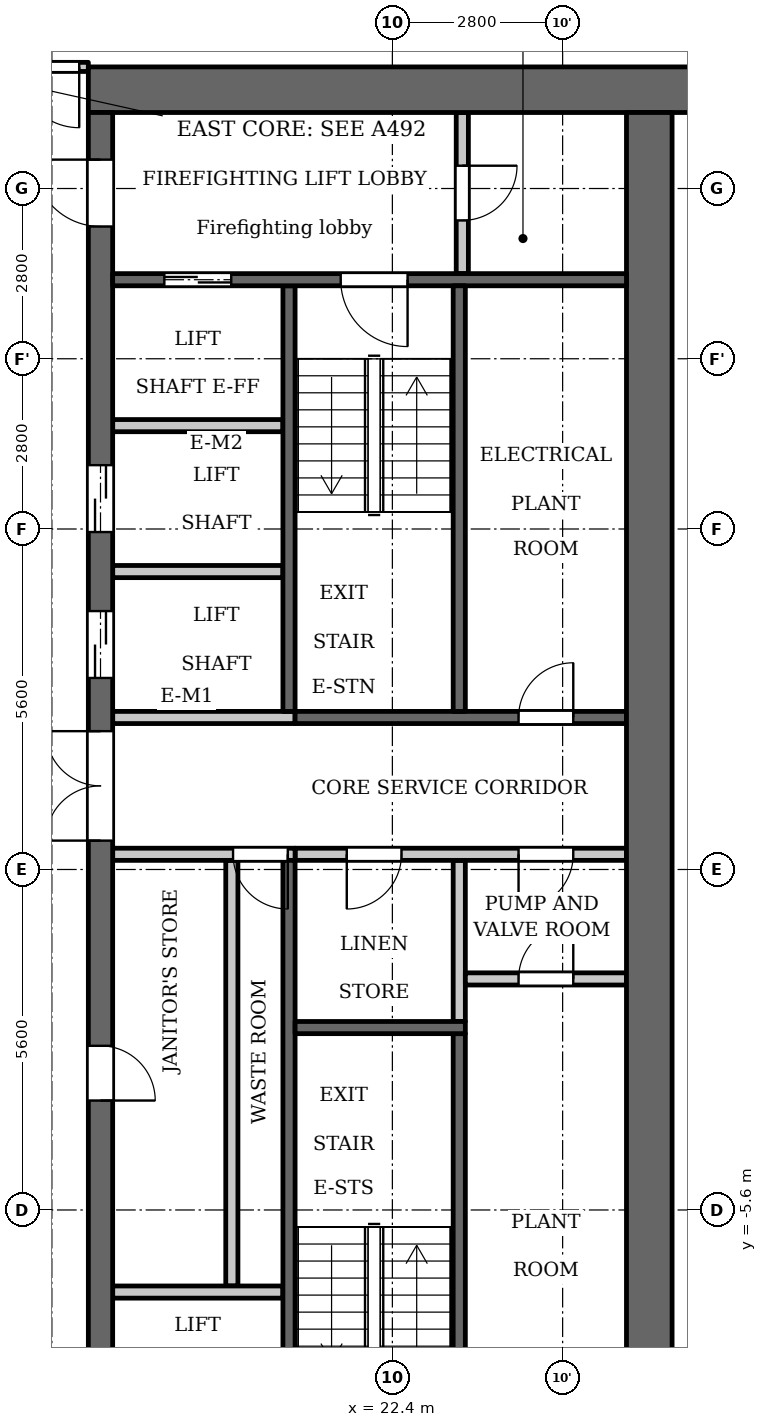
"""IFC4 building model, lengths in metres.
Left out: names, types, materials, properties, quantities, classifications, styles, units other than length and angle.
Written with IfcOpenShell. Run it as: python <this file> out.ifc"""

import sys

from ifc_helpers import new_model, si_unit, direction, frame, frame_2d, origin, place, context, subcontext, project, spatial, rectangle, extrude, element, fill, save


model = new_model("IFC4")
c1 = context("Model", 3, precision=1e-05, world=origin(), true_north=direction((0.0, 1.0)))
c2 = subcontext(c1, "Body", "Model", "MODEL_VIEW")
j1 = project(units=[si_unit("LENGTHUNIT", "METRE"), si_unit("PLANEANGLEUNIT", "RADIAN")], contexts=[c1])
p1 = place(None, origin())
s1 = spatial("IfcSite", under=j1, at=p1, CompositionType="ELEMENT")
p2 = place(p1, origin())
s2 = spatial("IfcBuilding", under=s1, at=p2, CompositionType="ELEMENT")
p3 = place(p2, frame((0.0, 0.0, 171.1)))
s3 = spatial("IfcBuildingStorey", under=s2, at=p3, CompositionType="ELEMENT", Elevation=171.1)
p4 = place(p3, frame((23.5, -2.5, 0.0), z_axis=(0.0, 0.0, 1.0), x_axis=(0.0, 1.0, 0.0)))
e1 = element("IfcWall", 1, at=p4, inside=s3, PredefinedType="PARTITIONING", context=c2, shape_type="SweptSolid", body=[
    extrude(rectangle(XDim=2.65, YDim=0.2, at=frame_2d((1.325, 0.0))), origin(), (0.0, 0.0, 1.0), 3.2),
])
p5 = place(p3, frame((20.7, 2.6, 0.0), z_axis=(0.0, 0.0, 1.0), x_axis=(0.0, 1.0, 0.0)))
e2 = element("IfcWall", 2, at=p5, inside=s3, PredefinedType="SHEAR", context=c2, shape_type="SweptSolid", body=[
    extrude(rectangle(XDim=7.0, YDim=0.2, at=frame_2d((3.5, 0.0))), origin(), (0.0, 0.0, 1.0), 3.2),
])
p6 = place(p3, frame((20.7, -9.6, 0.0), z_axis=(0.0, 0.0, 1.0), x_axis=(0.0, 1.0, 0.0)))
e3 = element("IfcWall", 3, at=p6, inside=s3, PredefinedType="SHEAR", context=c2, shape_type="SweptSolid", body=[
    extrude(rectangle(XDim=9.75, YDim=0.2, at=frame_2d((4.875, 0.0))), origin(), (0.0, 0.0, 1.0), 3.2),
])
p7 = place(p3, frame((20.8, 2.5, 0.0), z_axis=(0.0, 0.0, 1.0), x_axis=(1.0, 0.0, 0.0)))
e4 = element("IfcWall", 4, at=p7, inside=s3, PredefinedType="SHEAR", context=c2, shape_type="SweptSolid", body=[
    extrude(rectangle(XDim=5.45, YDim=0.2, at=frame_2d((2.725, 0.0))), origin(), (0.0, 0.0, 1.0), 3.2),
])
p8 = place(p7, frame((3.675, 0.0, 0.0)))
e5 = element("IfcOpeningElement", 5, at=p8, cuts=e4, PredefinedType="OPENING", context=c2, shape_type="SweptSolid", body=[
    extrude(rectangle(XDim=0.9, YDim=2.1, at=frame_2d((0.45, 1.05))), frame((0.0, 0.11, 0.0), z_axis=(0.0, -1.0, 0.0), x_axis=(1.0, 0.0, 0.0)), (0.0, 0.0, 1.0), 0.22),
])
p9 = place(p3, frame((20.8, 0.25, 0.0), z_axis=(0.0, 0.0, 1.0), x_axis=(1.0, 0.0, 0.0)))
e6 = element("IfcWall", 6, at=p9, inside=s3, PredefinedType="PARTITIONING", context=c2, shape_type="SweptSolid", body=[
    extrude(rectangle(XDim=5.45, YDim=0.2, at=frame_2d((2.725, 0.0))), origin(), (0.0, 0.0, 1.0), 3.2),
])
p10 = place(p9, frame((0.85, 0.0, 0.0)))
e7 = element("IfcOpeningElement", 7, at=p10, cuts=e6, PredefinedType="OPENING", context=c2, shape_type="SweptSolid", body=[
    extrude(rectangle(XDim=0.9, YDim=2.1, at=frame_2d((0.45, 1.05))), frame((0.0, 0.11, 0.0), z_axis=(0.0, -1.0, 0.0), x_axis=(1.0, 0.0, 0.0)), (0.0, 0.0, 1.0), 0.22),
])
p11 = place(p9, frame((3.675, 0.0, 0.0)))
e8 = element("IfcOpeningElement", 8, at=p11, cuts=e6, PredefinedType="OPENING", context=c2, shape_type="SweptSolid", body=[
    extrude(rectangle(XDim=0.9, YDim=2.1, at=frame_2d((0.45, 1.05))), frame((0.0, 0.11, 0.0), z_axis=(0.0, -1.0, 0.0), x_axis=(1.0, 0.0, 0.0)), (0.0, 0.0, 1.0), 0.22),
])
p12 = place(p3, frame((17.4, 12.825, 0.0), z_axis=(0.0, 0.0, 1.0), x_axis=(1.0, 0.0, 0.0)))
e9 = element("IfcWall", 9, at=p12, inside=s3, PredefinedType="SHEAR", context=c2, shape_type="SweptSolid", body=[
    extrude(rectangle(XDim=10.4, YDim=0.75, at=frame_2d((5.2, 0.0))), origin(), (0.0, 0.0, 1.0), 3.2),
])
p13 = place(p3, frame((19.76, -6.85, 0.0), z_axis=(0.0, 0.0, 1.0), x_axis=(0.0, 1.0, 0.0)))
e10 = element("IfcWall", 10, at=p13, inside=s3, PredefinedType="PARTITIONING", context=c2, shape_type="SweptSolid", body=[
    extrude(rectangle(XDim=7.0, YDim=0.2, at=frame_2d((3.5, 0.0))), origin(), (0.0, 0.0, 1.0), 3.2),
])
p14 = place(p3, frame((17.6, -12.45, 0.0), z_axis=(0.0, 0.0, 1.0), x_axis=(0.0, 1.0, 0.0)))
e11 = element("IfcWall", 11, at=p14, inside=s3, PredefinedType="SHEAR", context=c2, shape_type="SweptSolid", body=[
    extrude(rectangle(XDim=24.9, YDim=0.4, at=frame_2d((12.45, 0.0))), origin(), (0.0, 0.0, 1.0), 3.2),
])
p15 = place(p14, frame((8.65, 0.0, 0.0)))
e12 = element("IfcOpeningElement", 12, at=p15, cuts=e11, PredefinedType="OPENING", context=c2, shape_type="SweptSolid", body=[
    extrude(rectangle(XDim=0.9, YDim=2.1, at=frame_2d((0.45, 1.05))), frame((0.0, 0.21, 0.0), z_axis=(0.0, -1.0, 0.0), x_axis=(1.0, 0.0, 0.0)), (0.0, 0.0, 1.0), 0.42),
])
p16 = place(p14, frame((15.6, 0.0, 0.0)))
e13 = element("IfcOpeningElement", 13, at=p16, cuts=e11, PredefinedType="OPENING", context=c2, shape_type="SweptSolid", body=[
    extrude(rectangle(XDim=1.1, YDim=2.1, at=frame_2d((0.55, 1.05))), frame((0.0, 0.21, 0.0), z_axis=(0.0, -1.0, 0.0), x_axis=(1.0, 0.0, 0.0)), (0.0, 0.0, 1.0), 0.42),
])
p17 = place(p14, frame((18.0, 0.0, 0.0)))
e14 = element("IfcOpeningElement", 14, at=p17, cuts=e11, PredefinedType="OPENING", context=c2, shape_type="SweptSolid", body=[
    extrude(rectangle(XDim=1.1, YDim=2.1, at=frame_2d((0.55, 1.05))), frame((0.0, 0.21, 0.0), z_axis=(0.0, -1.0, 0.0), x_axis=(1.0, 0.0, 0.0)), (0.0, 0.0, 1.0), 0.42),
])
p18 = place(p14, frame((23.025, 0.0, 0.0)))
e15 = element("IfcOpeningElement", 15, at=p18, cuts=e11, PredefinedType="OPENING", context=c2, shape_type="SweptSolid", body=[
    extrude(rectangle(XDim=1.1, YDim=2.1, at=frame_2d((0.55, 1.05))), frame((0.0, 0.21, 0.0), z_axis=(0.0, -1.0, 0.0), x_axis=(1.0, 0.0, 0.0)), (0.0, 0.0, 1.0), 0.42),
])
p19 = place(p14, frame((0.775, 0.0, 0.0)))
e16 = element("IfcOpeningElement", 16, at=p19, cuts=e11, PredefinedType="OPENING", context=c2, shape_type="SweptSolid", body=[
    extrude(rectangle(XDim=1.1, YDim=2.1, at=frame_2d((0.55, 1.05))), frame((0.0, 0.21, 0.0), z_axis=(0.0, -1.0, 0.0), x_axis=(1.0, 0.0, 0.0)), (0.0, 0.0, 1.0), 0.42),
])
p20 = place(p14, frame((12.925, 0.0, 0.0)))
e17 = element("IfcOpeningElement", 17, at=p20, cuts=e11, PredefinedType="OPENING", context=c2, shape_type="SweptSolid", body=[
    extrude(rectangle(XDim=1.8, YDim=2.1, at=frame_2d((0.9, 1.05))), frame((0.0, 0.21, 0.0), z_axis=(0.0, -1.0, 0.0), x_axis=(1.0, 0.0, 0.0)), (0.0, 0.0, 1.0), 0.42),
])
p21 = place(p3, frame((26.625, -12.45, 0.0), z_axis=(0.0, 0.0, 1.0), x_axis=(0.0, 1.0, 0.0)))
e18 = element("IfcWall", 18, at=p21, inside=s3, PredefinedType="SHEAR", context=c2, shape_type="SweptSolid", body=[
    extrude(rectangle(XDim=24.9, YDim=0.75, at=frame_2d((12.45, 0.0))), origin(), (0.0, 0.0, 1.0), 3.2),
])
p22 = place(p3, frame((23.55, 9.8, 0.0), z_axis=(0.0, 0.0, 1.0), x_axis=(0.0, 1.0, 0.0)))
e19 = element("IfcWall", 19, at=p22, inside=s3, PredefinedType="PARTITIONING", context=c2, shape_type="SweptSolid", body=[
    extrude(rectangle(XDim=2.65, YDim=0.2, at=frame_2d((1.325, 0.0))), origin(), (0.0, 0.0, 1.0), 3.2),
])
p23 = place(p22, frame((0.875, 0.0, 0.0)))
e20 = element("IfcOpeningElement", 20, at=p23, cuts=e19, PredefinedType="OPENING", context=c2, shape_type="SweptSolid", body=[
    extrude(rectangle(XDim=0.9, YDim=2.1, at=frame_2d((0.45, 1.05))), frame((0.0, 0.11, 0.0), z_axis=(0.0, -1.0, 0.0), x_axis=(1.0, 0.0, 0.0)), (0.0, 0.0, 1.0), 0.22),
])
p24 = place(p3, frame((23.6, -1.8, 0.0), z_axis=(0.0, 0.0, 1.0), x_axis=(1.0, 0.0, 0.0)))
e21 = element("IfcWall", 21, at=p24, inside=s3, PredefinedType="PARTITIONING", context=c2, shape_type="SweptSolid", body=[
    extrude(rectangle(XDim=2.65, YDim=0.2, at=frame_2d((1.325, 0.0))), origin(), (0.0, 0.0, 1.0), 3.2),
])
p25 = place(p24, frame((0.875, 0.0, 0.0)))
e22 = element("IfcOpeningElement", 22, at=p25, cuts=e21, PredefinedType="OPENING", context=c2, shape_type="SweptSolid", body=[
    extrude(rectangle(XDim=0.9, YDim=2.1, at=frame_2d((0.45, 1.05))), frame((0.0, 0.11, 0.0), z_axis=(0.0, -1.0, 0.0), x_axis=(1.0, 0.0, 0.0)), (0.0, 0.0, 1.0), 0.22),
])
p26 = place(p3, frame((17.8, -6.95, 0.0), z_axis=(0.0, 0.0, 1.0), x_axis=(1.0, 0.0, 0.0)))
e23 = element("IfcWall", 23, at=p26, inside=s3, PredefinedType="PARTITIONING", context=c2, shape_type="SweptSolid", body=[
    extrude(rectangle(XDim=2.8, YDim=0.2, at=frame_2d((1.4, 0.0))), origin(), (0.0, 0.0, 1.0), 3.2),
])
p27 = place(p3, frame((17.8, 0.25, 0.0), z_axis=(0.0, 0.0, 1.0), x_axis=(1.0, 0.0, 0.0)))
e24 = element("IfcWall", 24, at=p27, inside=s3, PredefinedType="PARTITIONING", context=c2, shape_type="SweptSolid", body=[
    extrude(rectangle(XDim=3.0, YDim=0.2, at=frame_2d((1.5, 0.0))), origin(), (0.0, 0.0, 1.0), 3.2),
])
p28 = place(p27, frame((1.98, 0.0, 0.0)))
e25 = element("IfcOpeningElement", 25, at=p28, cuts=e24, PredefinedType="OPENING", context=c2, shape_type="SweptSolid", body=[
    extrude(rectangle(XDim=0.9, YDim=2.1, at=frame_2d((0.45, 1.05))), frame((0.0, 0.11, 0.0), z_axis=(0.0, -1.0, 0.0), x_axis=(1.0, 0.0, 0.0)), (0.0, 0.0, 1.0), 0.22),
])
p29 = place(p3, frame((17.8, 2.5, 0.0), z_axis=(0.0, 0.0, 1.0), x_axis=(1.0, 0.0, 0.0)))
e26 = element("IfcWall", 26, at=p29, inside=s3, PredefinedType="PARTITIONING", context=c2, shape_type="SweptSolid", body=[
    extrude(rectangle(XDim=3.0, YDim=0.2, at=frame_2d((1.5, 0.0))), origin(), (0.0, 0.0, 1.0), 3.2),
])
for number, where, z_axis, x_axis in (
    (27, (17.8, 4.9, 0.0), (0.0, 0.0, 1.0), (1.0, 0.0, 0.0)),
    (28, (17.8, 7.3, 0.0), (0.0, 0.0, 1.0), (1.0, 0.0, 0.0)),
):
    element("IfcWall", number, at=place(p3, frame(where, z_axis=z_axis, x_axis=x_axis)), inside=s3, PredefinedType="PARTITIONING", context=c2, shape_type="SweptSolid", body=[
        extrude(rectangle(XDim=2.8, YDim=0.2, at=frame_2d((1.4, 0.0))), origin(), (0.0, 0.0, 1.0), 3.2),
    ])
p30 = place(p3, frame((17.8, 9.7, 0.0), z_axis=(0.0, 0.0, 1.0), x_axis=(1.0, 0.0, 0.0)))
e29 = element("IfcWall", 29, at=p30, inside=s3, PredefinedType="SHEAR", context=c2, shape_type="SweptSolid", body=[
    extrude(rectangle(XDim=8.45, YDim=0.2, at=frame_2d((4.225, 0.0))), origin(), (0.0, 0.0, 1.0), 3.2),
])
p31 = place(p30, frame((0.85, 0.0, 0.0)))
e30 = element("IfcOpeningElement", 30, at=p31, cuts=e29, PredefinedType="OPENING", context=c2, shape_type="SweptSolid", body=[
    extrude(rectangle(XDim=1.1, YDim=2.1, at=frame_2d((0.55, 1.05))), frame((0.0, 0.11, 0.0), z_axis=(0.0, -1.0, 0.0), x_axis=(1.0, 0.0, 0.0)), (0.0, 0.0, 1.0), 0.22),
])
p32 = place(p30, frame((3.75, 0.0, 0.0)))
e31 = element("IfcOpeningElement", 31, at=p32, cuts=e29, PredefinedType="OPENING", context=c2, shape_type="SweptSolid", body=[
    extrude(rectangle(XDim=1.1, YDim=2.1, at=frame_2d((0.55, 1.05))), frame((0.0, 0.11, 0.0), z_axis=(0.0, -1.0, 0.0), x_axis=(1.0, 0.0, 0.0)), (0.0, 0.0, 1.0), 0.22),
])
p33 = place(p3, frame((23.5, 2.6, 0.0), z_axis=(0.0, 0.0, 1.0), x_axis=(0.0, 1.0, 0.0)))
e32 = element("IfcWall", 32, at=p33, inside=s3, PredefinedType="SHEAR", context=c2, shape_type="SweptSolid", body=[
    extrude(rectangle(XDim=7.0, YDim=0.2, at=frame_2d((3.5, 0.0))), origin(), (0.0, 0.0, 1.0), 3.2),
])
p34 = place(p3, frame((23.5, -9.6, 0.0), z_axis=(0.0, 0.0, 1.0), x_axis=(0.0, 1.0, 0.0)))
e33 = element("IfcWall", 33, at=p34, inside=s3, PredefinedType="SHEAR", context=c2, shape_type="SweptSolid", body=[
    extrude(rectangle(XDim=6.9, YDim=0.2, at=frame_2d((3.45, 0.0))), origin(), (0.0, 0.0, 1.0), 3.2),
])
p35 = place(p3, frame((20.8, -2.6, 0.0), z_axis=(0.0, 0.0, 1.0), x_axis=(1.0, 0.0, 0.0)))
e34 = element("IfcWall", 34, at=p35, inside=s3, PredefinedType="SHEAR", context=c2, shape_type="SweptSolid", body=[
    extrude(rectangle(XDim=2.8, YDim=0.2, at=frame_2d((1.4, 0.0))), origin(), (0.0, 0.0, 1.0), 3.2),
])
p36 = place(p3, frame((-17.4, 13.2, 0.0), z_axis=(0.0, 0.0, 1.0), x_axis=(1.0, 0.0, 0.0)))
e35 = element("IfcWall", 35, at=p36, inside=s3, PredefinedType="PARTITIONING", context=c2, shape_type="SweptSolid", body=[
    extrude(rectangle(XDim=34.8, YDim=0.15, at=frame_2d((17.4, 0.0))), origin(), (0.0, 0.0, 1.0), 3.2),
])
p37 = place(p36, frame((0.25, 0.0, 0.0)))
e36 = element("IfcOpeningElement", 36, at=p37, cuts=e35, PredefinedType="OPENING", context=c2, shape_type="SweptSolid", body=[
    extrude(rectangle(XDim=1.0, YDim=2.1, at=frame_2d((0.5, 1.05))), frame((0.0, 0.085, 0.0), z_axis=(0.0, -1.0, 0.0), x_axis=(1.0, 0.0, 0.0)), (0.0, 0.0, 1.0), 0.17),
])
p38 = place(p36, frame((33.65, 0.0, 0.0)))
e37 = element("IfcOpeningElement", 37, at=p38, cuts=e35, PredefinedType="OPENING", context=c2, shape_type="SweptSolid", body=[
    extrude(rectangle(XDim=1.0, YDim=2.1, at=frame_2d((0.5, 1.05))), frame((0.0, 0.085, 0.0), z_axis=(0.0, -1.0, 0.0), x_axis=(1.0, 0.0, 0.0)), (0.0, 0.0, 1.0), 0.17),
])
p39 = place(p36, frame((10.15, 0.0, 0.0)))
e38 = element("IfcOpeningElement", 38, at=p39, cuts=e35, PredefinedType="OPENING", context=c2, shape_type="SweptSolid", body=[
    extrude(rectangle(XDim=1.0, YDim=2.1, at=frame_2d((0.5, 1.05))), frame((0.0, 0.085, 0.0), z_axis=(0.0, -1.0, 0.0), x_axis=(1.0, 0.0, 0.0)), (0.0, 0.0, 1.0), 0.17),
])
p40 = place(p36, frame((15.75, 0.0, 0.0)))
e39 = element("IfcOpeningElement", 39, at=p40, cuts=e35, PredefinedType="OPENING", context=c2, shape_type="SweptSolid", body=[
    extrude(rectangle(XDim=1.0, YDim=2.1, at=frame_2d((0.5, 1.05))), frame((0.0, 0.085, 0.0), z_axis=(0.0, -1.0, 0.0), x_axis=(1.0, 0.0, 0.0)), (0.0, 0.0, 1.0), 0.17),
])
p41 = place(p36, frame((24.95, 0.0, 0.0)))
e40 = element("IfcOpeningElement", 40, at=p41, cuts=e35, PredefinedType="OPENING", context=c2, shape_type="SweptSolid", body=[
    extrude(rectangle(XDim=1.0, YDim=2.1, at=frame_2d((0.5, 1.05))), frame((0.0, 0.085, 0.0), z_axis=(0.0, -1.0, 0.0), x_axis=(1.0, 0.0, 0.0)), (0.0, 0.0, 1.0), 0.17),
])
p42 = place(p36, frame((29.95, 0.0, 0.0)))
e41 = element("IfcOpeningElement", 41, at=p42, cuts=e35, PredefinedType="OPENING", context=c2, shape_type="SweptSolid", body=[
    extrude(rectangle(XDim=1.0, YDim=2.1, at=frame_2d((0.5, 1.05))), frame((0.0, 0.085, 0.0), z_axis=(0.0, -1.0, 0.0), x_axis=(1.0, 0.0, 0.0)), (0.0, 0.0, 1.0), 0.17),
])
p43 = place(p15, origin())
e42 = element("IfcDoor", 42, at=p43, inside=s3, OperationType="SINGLE_SWING_LEFT", PredefinedType="DOOR", context=c2, shape_type="SweptSolid", body=[
    extrude(rectangle(XDim=0.9, YDim=2.1, at=frame_2d((0.45, 1.05))), frame((0.0, 0.025, 0.0), z_axis=(0.0, -1.0, 0.0), x_axis=(1.0, 0.0, 0.0)), (0.0, 0.0, 1.0), 0.05),
])
fill(e12, e42)
p44 = place(p28, origin())
e43 = element("IfcDoor", 43, at=p44, inside=s3, OperationType="SINGLE_SWING_RIGHT", PredefinedType="DOOR", context=c2, shape_type="SweptSolid", body=[
    extrude(rectangle(XDim=0.9, YDim=2.1, at=frame_2d((0.45, 1.05))), frame((0.0, 0.025, 0.0), z_axis=(0.0, -1.0, 0.0), x_axis=(1.0, 0.0, 0.0)), (0.0, 0.0, 1.0), 0.05),
])
fill(e25, e43)
p45 = place(p16, origin())
e44 = element("IfcDoor", 44, at=p45, inside=s3, OperationType="DOUBLE_DOOR_SLIDING", PredefinedType="DOOR", context=c2, shape_type="SweptSolid", body=[
    extrude(rectangle(XDim=1.1, YDim=2.1, at=frame_2d((0.55, 1.05))), frame((0.0, 0.025, 0.0), z_axis=(0.0, -1.0, 0.0), x_axis=(1.0, 0.0, 0.0)), (0.0, 0.0, 1.0), 0.05),
])
fill(e13, e44)
p46 = place(p17, origin())
e45 = element("IfcDoor", 45, at=p46, inside=s3, OperationType="DOUBLE_DOOR_SLIDING", PredefinedType="DOOR", context=c2, shape_type="SweptSolid", body=[
    extrude(rectangle(XDim=1.1, YDim=2.1, at=frame_2d((0.55, 1.05))), frame((0.0, 0.025, 0.0), z_axis=(0.0, -1.0, 0.0), x_axis=(1.0, 0.0, 0.0)), (0.0, 0.0, 1.0), 0.05),
])
fill(e14, e45)
p47 = place(p31, origin())
e46 = element("IfcDoor", 46, at=p47, inside=s3, OperationType="DOUBLE_DOOR_SLIDING", PredefinedType="DOOR", context=c2, shape_type="SweptSolid", body=[
    extrude(rectangle(XDim=1.1, YDim=2.1, at=frame_2d((0.55, 1.05))), frame((0.0, 0.025, 0.0), z_axis=(0.0, -1.0, 0.0), x_axis=(1.0, 0.0, 0.0)), (0.0, 0.0, 1.0), 0.05),
])
fill(e30, e46)
p48 = place(p18, origin())
e47 = element("IfcDoor", 47, at=p48, inside=s3, OperationType="SINGLE_SWING_LEFT", PredefinedType="DOOR", context=c2, shape_type="SweptSolid", body=[
    extrude(rectangle(XDim=1.1, YDim=2.1, at=frame_2d((0.55, 1.05))), frame((0.0, 0.025, 0.0), z_axis=(0.0, -1.0, 0.0), x_axis=(1.0, 0.0, 0.0)), (0.0, 0.0, 1.0), 0.05),
])
fill(e15, e47)
p49 = place(p23, origin())
e48 = element("IfcDoor", 48, at=p49, inside=s3, OperationType="SINGLE_SWING_RIGHT", PredefinedType="DOOR", context=c2, shape_type="SweptSolid", body=[
    extrude(rectangle(XDim=0.9, YDim=2.1, at=frame_2d((0.45, 1.05))), frame((0.0, 0.025, 0.0), z_axis=(0.0, -1.0, 0.0), x_axis=(1.0, 0.0, 0.0)), (0.0, 0.0, 1.0), 0.05),
])
fill(e20, e48)
p50 = place(p32, origin())
e49 = element("IfcDoor", 49, at=p50, inside=s3, OperationType="SINGLE_SWING_RIGHT", PredefinedType="DOOR", context=c2, shape_type="SweptSolid", body=[
    extrude(rectangle(XDim=1.1, YDim=2.1, at=frame_2d((0.55, 1.05))), frame((0.0, 0.025, 0.0), z_axis=(0.0, -1.0, 0.0), x_axis=(1.0, 0.0, 0.0)), (0.0, 0.0, 1.0), 0.05),
])
fill(e31, e49)
p51 = place(p20, origin())
e50 = element("IfcDoor", 50, at=p51, inside=s3, OperationType="DOUBLE_DOOR_SINGLE_SWING", PredefinedType="DOOR", context=c2, shape_type="SweptSolid", body=[
    extrude(rectangle(XDim=1.8, YDim=2.1, at=frame_2d((0.9, 1.05))), frame((0.0, 0.025, 0.0), z_axis=(0.0, -1.0, 0.0), x_axis=(1.0, 0.0, 0.0)), (0.0, 0.0, 1.0), 0.05),
])
fill(e17, e50)
p52 = place(p10, origin())
e51 = element("IfcDoor", 51, at=p52, inside=s3, OperationType="SINGLE_SWING_LEFT", PredefinedType="DOOR", context=c2, shape_type="SweptSolid", body=[
    extrude(rectangle(XDim=0.9, YDim=2.1, at=frame_2d((0.45, 1.05))), frame((0.0, 0.025, 0.0), z_axis=(0.0, -1.0, 0.0), x_axis=(1.0, 0.0, 0.0)), (0.0, 0.0, 1.0), 0.05),
])
fill(e7, e51)
p53 = place(p25, origin())
e52 = element("IfcDoor", 52, at=p53, inside=s3, OperationType="SINGLE_SWING_LEFT", PredefinedType="DOOR", context=c2, shape_type="SweptSolid", body=[
    extrude(rectangle(XDim=0.9, YDim=2.1, at=frame_2d((0.45, 1.05))), frame((0.0, 0.025, 0.0), z_axis=(0.0, -1.0, 0.0), x_axis=(1.0, 0.0, 0.0)), (0.0, 0.0, 1.0), 0.05),
])
fill(e22, e52)
p54 = place(p11, origin())
e53 = element("IfcDoor", 53, at=p54, inside=s3, OperationType="SINGLE_SWING_LEFT", PredefinedType="DOOR", context=c2, shape_type="SweptSolid", body=[
    extrude(rectangle(XDim=0.9, YDim=2.1, at=frame_2d((0.45, 1.05))), frame((0.0, 0.025, 0.0), z_axis=(0.0, -1.0, 0.0), x_axis=(1.0, 0.0, 0.0)), (0.0, 0.0, 1.0), 0.05),
])
fill(e8, e53)
p55 = place(p8, origin())
e54 = element("IfcDoor", 54, at=p55, inside=s3, OperationType="SINGLE_SWING_LEFT", PredefinedType="DOOR", context=c2, shape_type="SweptSolid", body=[
    extrude(rectangle(XDim=0.9, YDim=2.1, at=frame_2d((0.45, 1.05))), frame((0.0, 0.025, 0.0), z_axis=(0.0, -1.0, 0.0), x_axis=(1.0, 0.0, 0.0)), (0.0, 0.0, 1.0), 0.05),
])
fill(e5, e54)
p56 = place(p38, origin())
e55 = element("IfcDoor", 55, at=p56, inside=s3, OperationType="SINGLE_SWING_RIGHT", PredefinedType="DOOR", context=c2, shape_type="SweptSolid", body=[
    extrude(rectangle(XDim=1.0, YDim=2.1, at=frame_2d((0.5, 1.05))), frame((0.0, 0.025, 0.0), z_axis=(0.0, -1.0, 0.0), x_axis=(1.0, 0.0, 0.0)), (0.0, 0.0, 1.0), 0.05),
])
fill(e37, e55)
save(model, sys.argv[1])
